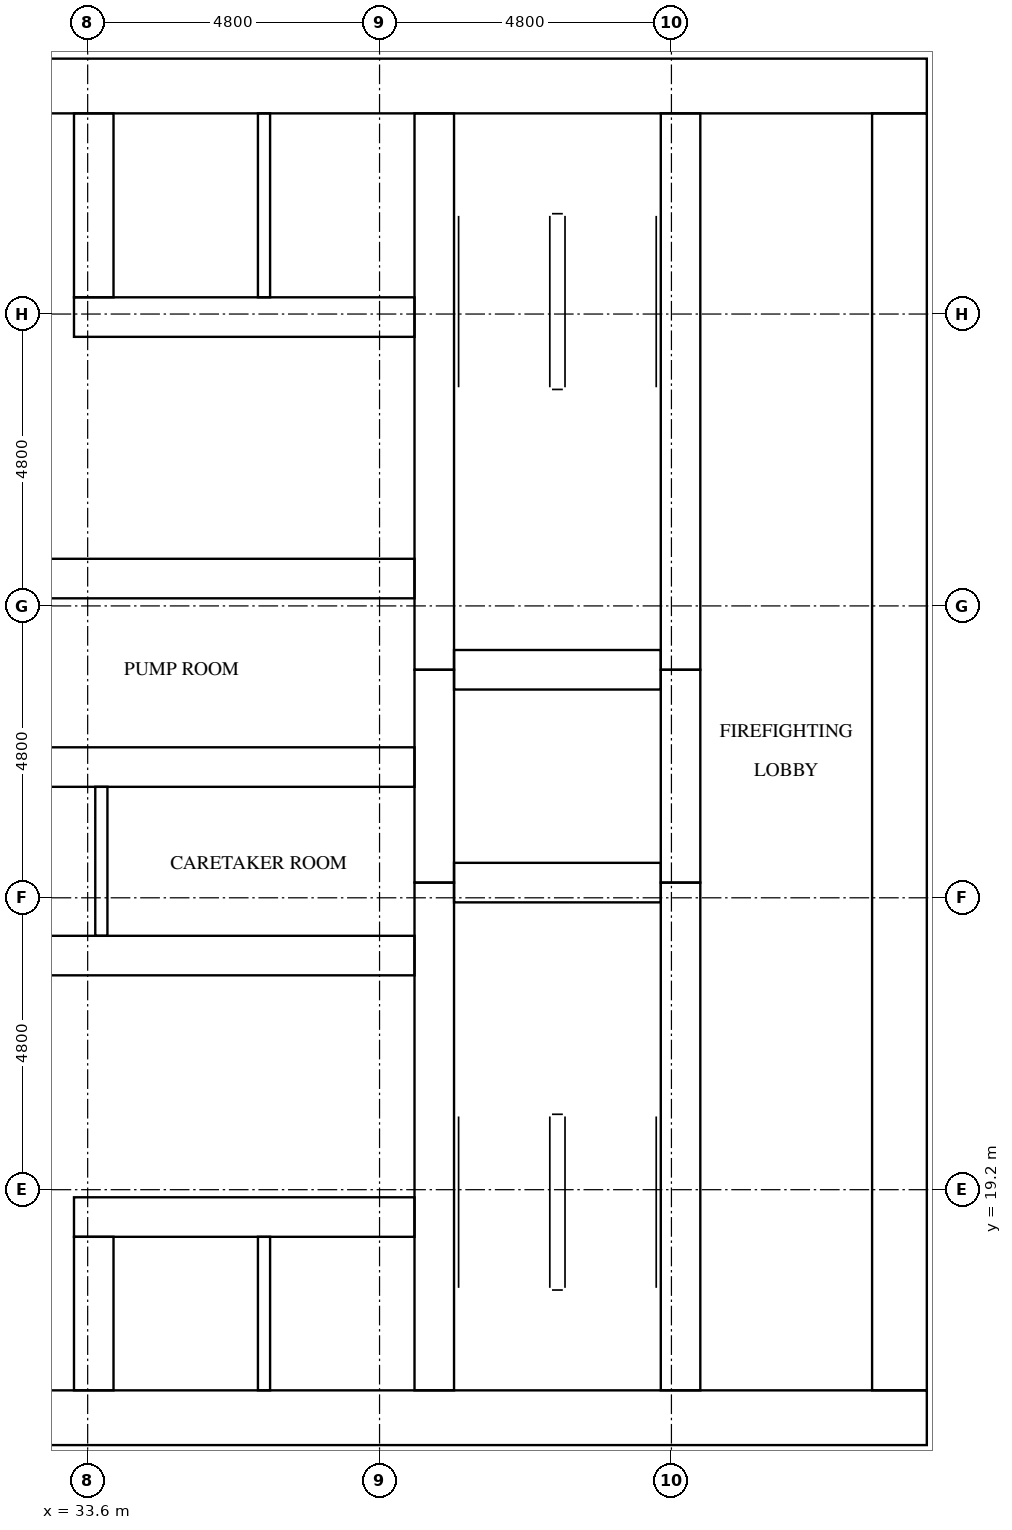
"""IFC4 building model, lengths in metres.
Left out: names, types, materials, properties, quantities, classifications, styles, units other than length and angle.
Written with IfcOpenShell. Run it as: python <this file> out.ifc"""

import sys

from ifc_helpers import new_model, si_unit, direction, frame, frame_2d, origin, place, context, subcontext, project, spatial, rectangle, extrude, element, fill, save


model = new_model("IFC4")
c1 = context("Model", 3, precision=1e-05, world=origin(), true_north=direction((0.0, 1.0)))
c2 = subcontext(c1, "Body", "Model", "MODEL_VIEW")
j1 = project(units=[si_unit("LENGTHUNIT", "METRE"), si_unit("PLANEANGLEUNIT", "RADIAN")], contexts=[c1])
p1 = place(None, origin())
s1 = spatial("IfcSite", under=j1, at=p1, CompositionType="ELEMENT")
p2 = place(p1, origin())
s2 = spatial("IfcBuilding", under=s1, at=p2, CompositionType="ELEMENT")
p3 = place(p2, frame((0.0, 0.0, 106.7)))
s3 = spatial("IfcBuildingStorey", under=s2, at=p3, CompositionType="ELEMENT", Elevation=106.7)
p4 = place(p3, frame((15.0, 15.45, 0.0), z_axis=(0.0, 0.0, 1.0), x_axis=(1.0, 0.0, 0.0)))
e1 = element("IfcWall", 1, at=p4, inside=s3, PredefinedType="SHEAR", context=c2, shape_type="SweptSolid", body=[
    extrude(rectangle(XDim=32.4, YDim=0.9, at=frame_2d((16.2, 0.0))), origin(), (0.0, 0.0, 1.0), 3.2),
])
p5 = place(p4, frame((15.3, 0.0, 0.0)))
e2 = element("IfcOpeningElement", 2, at=p5, cuts=e1, PredefinedType="OPENING", context=c2, shape_type="SweptSolid", body=[
    extrude(rectangle(XDim=1.8, YDim=2.1, at=frame_2d((0.9, 1.05))), frame((0.0, 0.46, 0.0), z_axis=(0.0, -1.0, 0.0), x_axis=(1.0, 0.0, 0.0)), (0.0, 0.0, 1.0), 0.92),
])
p6 = place(p3, frame((15.0, 37.35, 0.0), z_axis=(0.0, 0.0, 1.0), x_axis=(1.0, 0.0, 0.0)))
e3 = element("IfcWall", 3, at=p6, inside=s3, PredefinedType="SHEAR", context=c2, shape_type="SweptSolid", body=[
    extrude(rectangle(XDim=32.4, YDim=0.9, at=frame_2d((16.2, 0.0))), origin(), (0.0, 0.0, 1.0), 3.2),
])
p7 = place(p6, frame((15.3, 0.0, 0.0)))
e4 = element("IfcOpeningElement", 4, at=p7, cuts=e3, PredefinedType="OPENING", context=c2, shape_type="SweptSolid", body=[
    extrude(rectangle(XDim=1.8, YDim=2.1, at=frame_2d((0.9, 1.05))), frame((0.0, 0.46, 0.0), z_axis=(0.0, -1.0, 0.0), x_axis=(1.0, 0.0, 0.0)), (0.0, 0.0, 1.0), 0.92),
])
p8 = place(p6, frame((1.794, 0.0, 0.0)))
e5 = element("IfcOpeningElement", 5, at=p8, cuts=e3, PredefinedType="OPENING", context=c2, shape_type="SweptSolid", body=[
    extrude(rectangle(XDim=1.0, YDim=2.1, at=frame_2d((0.5, 1.05))), frame((0.0, 0.46, 0.0), z_axis=(0.0, -1.0, 0.0), x_axis=(1.0, 0.0, 0.0)), (0.0, 0.0, 1.0), 0.92),
])
p9 = place(p6, frame((5.331, 0.0, 0.0)))
e6 = element("IfcOpeningElement", 6, at=p9, cuts=e3, PredefinedType="OPENING", context=c2, shape_type="SweptSolid", body=[
    extrude(rectangle(XDim=1.0, YDim=2.1, at=frame_2d((0.5, 1.05))), frame((0.0, 0.46, 0.0), z_axis=(0.0, -1.0, 0.0), x_axis=(1.0, 0.0, 0.0)), (0.0, 0.0, 1.0), 0.92),
])
p10 = place(p3, frame((46.95, 15.9, 0.0), z_axis=(0.0, 0.0, 1.0), x_axis=(0.0, 1.0, 0.0)))
e7 = element("IfcWall", 7, at=p10, inside=s3, PredefinedType="SHEAR", context=c2, shape_type="SweptSolid", body=[
    extrude(rectangle(XDim=21.0, YDim=0.9, at=frame_2d((10.5, 0.0))), origin(), (0.0, 0.0, 1.0), 3.2),
])
p11 = place(p10, frame((10.2, 0.0, 0.0)))
e8 = element("IfcOpeningElement", 8, at=p11, cuts=e7, PredefinedType="OPENING", context=c2, shape_type="SweptSolid", body=[
    extrude(rectangle(XDim=1.2, YDim=2.1, at=frame_2d((0.6, 1.05))), frame((0.0, 0.46, 0.0), z_axis=(0.0, -1.0, 0.0), x_axis=(1.0, 0.0, 0.0)), (0.0, 0.0, 1.0), 0.92),
])
p12 = place(p3, frame((39.3, 15.9, 0.0), z_axis=(0.0, 0.0, 1.0), x_axis=(0.0, 1.0, 0.0)))
e9 = element("IfcWall", 9, at=p12, inside=s3, PredefinedType="SHEAR", context=c2, shape_type="SweptSolid", body=[
    extrude(rectangle(XDim=8.35, YDim=0.65, at=frame_2d((4.175, 0.0))), origin(), (0.0, 0.0, 1.0), 3.2),
])
p13 = place(p3, frame((39.3, 24.25, 0.0), z_axis=(0.0, 0.0, 1.0), x_axis=(0.0, 1.0, 0.0)))
e10 = element("IfcWall", 10, at=p13, inside=s3, PredefinedType="SHEAR", context=c2, shape_type="SweptSolid", body=[
    extrude(rectangle(XDim=3.5, YDim=0.65, at=frame_2d((1.75, 0.0))), origin(), (0.0, 0.0, 1.0), 3.2),
])
p14 = place(p3, frame((39.3, 27.75, 0.0), z_axis=(0.0, 0.0, 1.0), x_axis=(0.0, 1.0, 0.0)))
e11 = element("IfcWall", 11, at=p14, inside=s3, PredefinedType="SHEAR", context=c2, shape_type="SweptSolid", body=[
    extrude(rectangle(XDim=9.15, YDim=0.65, at=frame_2d((4.575, 0.0))), origin(), (0.0, 0.0, 1.0), 3.2),
])
p15 = place(p3, frame((43.35, 15.9, 0.0), z_axis=(0.0, 0.0, 1.0), x_axis=(0.0, 1.0, 0.0)))
e12 = element("IfcWall", 12, at=p15, inside=s3, PredefinedType="SHEAR", context=c2, shape_type="SweptSolid", body=[
    extrude(rectangle(XDim=8.35, YDim=0.65, at=frame_2d((4.175, 0.0))), origin(), (0.0, 0.0, 1.0), 3.2),
])
p16 = place(p15, frame((0.3, 0.0, 0.0)))
e13 = element("IfcOpeningElement", 13, at=p16, cuts=e12, PredefinedType="OPENING", context=c2, shape_type="SweptSolid", body=[
    extrude(rectangle(XDim=1.2, YDim=2.1, at=frame_2d((0.6, 1.05))), frame((0.0, 0.335, 0.0), z_axis=(0.0, -1.0, 0.0), x_axis=(1.0, 0.0, 0.0)), (0.0, 0.0, 1.0), 0.67),
])
p17 = place(p3, frame((43.35, 24.25, 0.0), z_axis=(0.0, 0.0, 1.0), x_axis=(0.0, 1.0, 0.0)))
e14 = element("IfcWall", 14, at=p17, inside=s3, PredefinedType="SHEAR", context=c2, shape_type="SweptSolid", body=[
    extrude(rectangle(XDim=3.5, YDim=0.65, at=frame_2d((1.75, 0.0))), origin(), (0.0, 0.0, 1.0), 3.2),
])
p18 = place(p17, frame((1.2, 0.0, 0.0)))
e15 = element("IfcOpeningElement", 15, at=p18, cuts=e14, PredefinedType="OPENING", context=c2, shape_type="SweptSolid", body=[
    extrude(rectangle(XDim=1.1, YDim=2.1, at=frame_2d((0.55, 1.05))), frame((0.0, 0.335, 0.0), z_axis=(0.0, -1.0, 0.0), x_axis=(1.0, 0.0, 0.0)), (0.0, 0.0, 1.0), 0.67),
])
p19 = place(p3, frame((43.35, 27.75, 0.0), z_axis=(0.0, 0.0, 1.0), x_axis=(0.0, 1.0, 0.0)))
e16 = element("IfcWall", 16, at=p19, inside=s3, PredefinedType="SHEAR", context=c2, shape_type="SweptSolid", body=[
    extrude(rectangle(XDim=9.15, YDim=0.65, at=frame_2d((4.575, 0.0))), origin(), (0.0, 0.0, 1.0), 3.2),
])
p20 = place(p19, frame((7.65, 0.0, 0.0)))
e17 = element("IfcOpeningElement", 17, at=p20, cuts=e16, PredefinedType="OPENING", context=c2, shape_type="SweptSolid", body=[
    extrude(rectangle(XDim=1.2, YDim=2.1, at=frame_2d((0.6, 1.05))), frame((0.0, 0.335, 0.0), z_axis=(0.0, -1.0, 0.0), x_axis=(1.0, 0.0, 0.0)), (0.0, 0.0, 1.0), 0.67),
])
for number, where, z_axis, x_axis in (
    (18, (39.625, 24.25, 0.0), (0.0, 0.0, 1.0), (1.0, 0.0, 0.0)),
    (19, (39.625, 27.75, 0.0), (0.0, 0.0, 1.0), (1.0, 0.0, 0.0)),
):
    element("IfcWall", number, at=place(p3, frame(where, z_axis=z_axis, x_axis=x_axis)), inside=s3, PredefinedType="SHEAR", context=c2, shape_type="SweptSolid", body=[
        extrude(rectangle(XDim=3.4, YDim=0.65, at=frame_2d((1.7, 0.0))), origin(), (0.0, 0.0, 1.0), 3.2),
    ])
p21 = place(p3, frame((33.375, 18.75, 0.0), z_axis=(0.0, 0.0, 1.0), x_axis=(1.0, 0.0, 0.0)))
e20 = element("IfcWall", 20, at=p21, inside=s3, PredefinedType="SHEAR", context=c2, shape_type="SweptSolid", body=[
    extrude(rectangle(XDim=5.6, YDim=0.65, at=frame_2d((2.8, 0.0))), origin(), (0.0, 0.0, 1.0), 3.2),
])
p22 = place(p21, frame((1.288, 0.0, 0.0)))
e21 = element("IfcOpeningElement", 21, at=p22, cuts=e20, PredefinedType="OPENING", context=c2, shape_type="SweptSolid", body=[
    extrude(rectangle(XDim=1.1, YDim=2.1, at=frame_2d((0.55, 1.05))), frame((0.0, 0.335, 0.0), z_axis=(0.0, -1.0, 0.0), x_axis=(1.0, 0.0, 0.0)), (0.0, 0.0, 1.0), 0.67),
])
p23 = place(p21, frame((3.863, 0.0, 0.0)))
e22 = element("IfcOpeningElement", 22, at=p23, cuts=e20, PredefinedType="OPENING", context=c2, shape_type="SweptSolid", body=[
    extrude(rectangle(XDim=1.1, YDim=2.1, at=frame_2d((0.55, 1.05))), frame((0.0, 0.335, 0.0), z_axis=(0.0, -1.0, 0.0), x_axis=(1.0, 0.0, 0.0)), (0.0, 0.0, 1.0), 0.67),
])
p24 = place(p3, frame((23.425, 23.05, 0.0), z_axis=(0.0, 0.0, 1.0), x_axis=(1.0, 0.0, 0.0)))
e23 = element("IfcWall", 23, at=p24, inside=s3, PredefinedType="SHEAR", context=c2, shape_type="SweptSolid", body=[
    extrude(rectangle(XDim=15.55, YDim=0.65, at=frame_2d((7.775, 0.0))), origin(), (0.0, 0.0, 1.0), 3.2),
])
p25 = place(p24, frame((2.025, 0.0, 0.0)))
e24 = element("IfcOpeningElement", 24, at=p25, cuts=e23, PredefinedType="OPENING", context=c2, shape_type="SweptSolid", body=[
    extrude(rectangle(XDim=1.0, YDim=2.1, at=frame_2d((0.5, 1.05))), frame((0.0, 0.335, 0.0), z_axis=(0.0, -1.0, 0.0), x_axis=(1.0, 0.0, 0.0)), (0.0, 0.0, 1.0), 0.67),
])
p26 = place(p24, frame((12.525, 0.0, 0.0)))
e25 = element("IfcOpeningElement", 25, at=p26, cuts=e23, PredefinedType="OPENING", context=c2, shape_type="SweptSolid", body=[
    extrude(rectangle(XDim=1.0, YDim=2.1, at=frame_2d((0.5, 1.05))), frame((0.0, 0.335, 0.0), z_axis=(0.0, -1.0, 0.0), x_axis=(1.0, 0.0, 0.0)), (0.0, 0.0, 1.0), 0.67),
])
p27 = place(p3, frame((23.425, 26.15, 0.0), z_axis=(0.0, 0.0, 1.0), x_axis=(1.0, 0.0, 0.0)))
e26 = element("IfcWall", 26, at=p27, inside=s3, PredefinedType="SHEAR", context=c2, shape_type="SweptSolid", body=[
    extrude(rectangle(XDim=15.55, YDim=0.65, at=frame_2d((7.775, 0.0))), origin(), (0.0, 0.0, 1.0), 3.2),
])
p28 = place(p3, frame((23.425, 29.25, 0.0), z_axis=(0.0, 0.0, 1.0), x_axis=(1.0, 0.0, 0.0)))
e27 = element("IfcWall", 27, at=p28, inside=s3, PredefinedType="SHEAR", context=c2, shape_type="SweptSolid", body=[
    extrude(rectangle(XDim=15.55, YDim=0.65, at=frame_2d((7.775, 0.0))), origin(), (0.0, 0.0, 1.0), 3.2),
])
p29 = place(p28, frame((3.337, 0.0, 0.0)))
e28 = element("IfcOpeningElement", 28, at=p29, cuts=e27, PredefinedType="OPENING", context=c2, shape_type="SweptSolid", body=[
    extrude(rectangle(XDim=1.0, YDim=2.1, at=frame_2d((0.5, 1.05))), frame((0.0, 0.335, 0.0), z_axis=(0.0, -1.0, 0.0), x_axis=(1.0, 0.0, 0.0)), (0.0, 0.0, 1.0), 0.67),
])
p30 = place(p28, frame((11.212, 0.0, 0.0)))
e29 = element("IfcOpeningElement", 29, at=p30, cuts=e27, PredefinedType="OPENING", context=c2, shape_type="SweptSolid", body=[
    extrude(rectangle(XDim=1.0, YDim=2.1, at=frame_2d((0.5, 1.05))), frame((0.0, 0.335, 0.0), z_axis=(0.0, -1.0, 0.0), x_axis=(1.0, 0.0, 0.0)), (0.0, 0.0, 1.0), 0.67),
])
p31 = place(p3, frame((33.375, 33.55, 0.0), z_axis=(0.0, 0.0, 1.0), x_axis=(1.0, 0.0, 0.0)))
e30 = element("IfcWall", 30, at=p31, inside=s3, PredefinedType="SHEAR", context=c2, shape_type="SweptSolid", body=[
    extrude(rectangle(XDim=5.6, YDim=0.65, at=frame_2d((2.8, 0.0))), origin(), (0.0, 0.0, 1.0), 3.2),
])
p32 = place(p3, frame((33.7, 15.9, 0.0), z_axis=(0.0, 0.0, 1.0), x_axis=(0.0, 1.0, 0.0)))
e31 = element("IfcWall", 31, at=p32, inside=s3, PredefinedType="SHEAR", context=c2, shape_type="SweptSolid", body=[
    extrude(rectangle(XDim=2.525, YDim=0.65, at=frame_2d((1.263, 0.0))), origin(), (0.0, 0.0, 1.0), 3.2),
])
p33 = place(p3, frame((33.7, 33.875, 0.0), z_axis=(0.0, 0.0, 1.0), x_axis=(0.0, 1.0, 0.0)))
e32 = element("IfcWall", 32, at=p33, inside=s3, PredefinedType="SHEAR", context=c2, shape_type="SweptSolid", body=[
    extrude(rectangle(XDim=3.025, YDim=0.65, at=frame_2d((1.512, 0.0))), origin(), (0.0, 0.0, 1.0), 3.2),
])
p34 = place(p3, frame((33.825, 23.375, 0.0), z_axis=(0.0, 0.0, 1.0), x_axis=(0.0, 1.0, 0.0)))
e33 = element("IfcWall", 33, at=p34, inside=s3, PredefinedType="SOLIDWALL", context=c2, shape_type="SweptSolid", body=[
    extrude(rectangle(XDim=2.45, YDim=0.2, at=frame_2d((1.225, 0.0))), origin(), (0.0, 0.0, 1.0), 3.2),
])
p35 = place(p3, frame((36.5, 15.9, 0.0), z_axis=(0.0, 0.0, 1.0), x_axis=(0.0, 1.0, 0.0)))
e34 = element("IfcWall", 34, at=p35, inside=s3, PredefinedType="SOLIDWALL", context=c2, shape_type="SweptSolid", body=[
    extrude(rectangle(XDim=2.525, YDim=0.2, at=frame_2d((1.263, 0.0))), origin(), (0.0, 0.0, 1.0), 3.2),
])
p36 = place(p3, frame((36.5, 33.875, 0.0), z_axis=(0.0, 0.0, 1.0), x_axis=(0.0, 1.0, 0.0)))
e35 = element("IfcWall", 35, at=p36, inside=s3, PredefinedType="SOLIDWALL", context=c2, shape_type="SweptSolid", body=[
    extrude(rectangle(XDim=3.025, YDim=0.2, at=frame_2d((1.512, 0.0))), origin(), (0.0, 0.0, 1.0), 3.2),
])
p37 = place(p22, origin())
e36 = element("IfcDoor", 36, at=p37, inside=s3, OperationType="DOUBLE_DOOR_SLIDING", PredefinedType="DOOR", context=c2, shape_type="SweptSolid", body=[
    extrude(rectangle(XDim=1.1, YDim=2.1, at=frame_2d((0.55, 1.05))), frame((0.0, 0.025, 0.0), z_axis=(0.0, -1.0, 0.0), x_axis=(1.0, 0.0, 0.0)), (0.0, 0.0, 1.0), 0.05),
])
fill(e21, e36)
p38 = place(p23, origin())
e37 = element("IfcDoor", 37, at=p38, inside=s3, OperationType="DOUBLE_DOOR_SLIDING", PredefinedType="DOOR", context=c2, shape_type="SweptSolid", body=[
    extrude(rectangle(XDim=1.1, YDim=2.1, at=frame_2d((0.55, 1.05))), frame((0.0, 0.025, 0.0), z_axis=(0.0, -1.0, 0.0), x_axis=(1.0, 0.0, 0.0)), (0.0, 0.0, 1.0), 0.05),
])
fill(e22, e37)
p39 = place(p18, origin())
e38 = element("IfcDoor", 38, at=p39, inside=s3, OperationType="DOUBLE_DOOR_SLIDING", PredefinedType="DOOR", context=c2, shape_type="SweptSolid", body=[
    extrude(rectangle(XDim=1.1, YDim=2.1, at=frame_2d((0.55, 1.05))), frame((0.0, 0.025, 0.0), z_axis=(0.0, -1.0, 0.0), x_axis=(1.0, 0.0, 0.0)), (0.0, 0.0, 1.0), 0.05),
])
fill(e15, e38)
p40 = place(p16, origin())
e39 = element("IfcDoor", 39, at=p40, inside=s3, OperationType="SINGLE_SWING_RIGHT", PredefinedType="DOOR", context=c2, shape_type="SweptSolid", body=[
    extrude(rectangle(XDim=1.2, YDim=2.1, at=frame_2d((0.6, 1.05))), frame((0.0, 0.025, 0.0), z_axis=(0.0, -1.0, 0.0), x_axis=(1.0, 0.0, 0.0)), (0.0, 0.0, 1.0), 0.05),
])
fill(e13, e39)
p41 = place(p20, origin())
e40 = element("IfcDoor", 40, at=p41, inside=s3, OperationType="SINGLE_SWING_LEFT", PredefinedType="DOOR", context=c2, shape_type="SweptSolid", body=[
    extrude(rectangle(XDim=1.2, YDim=2.1, at=frame_2d((0.6, 1.05))), frame((0.0, 0.025, 0.0), z_axis=(0.0, -1.0, 0.0), x_axis=(1.0, 0.0, 0.0)), (0.0, 0.0, 1.0), 0.05),
])
fill(e17, e40)
p42 = place(p11, origin())
e41 = element("IfcDoor", 41, at=p42, inside=s3, OperationType="SINGLE_SWING_LEFT", PredefinedType="DOOR", context=c2, shape_type="SweptSolid", body=[
    extrude(rectangle(XDim=1.2, YDim=2.1, at=frame_2d((0.6, 1.05))), frame((0.0, 0.025, 0.0), z_axis=(0.0, -1.0, 0.0), x_axis=(1.0, 0.0, 0.0)), (0.0, 0.0, 1.0), 0.05),
])
fill(e8, e41)
p43 = place(p26, frame((1.0, 0.0, 0.0), z_axis=(0.0, 0.0, 1.0), x_axis=(-1.0, 0.0, 0.0)))
e42 = element("IfcDoor", 42, at=p43, inside=s3, OperationType="SINGLE_SWING_LEFT", PredefinedType="DOOR", context=c2, shape_type="SweptSolid", body=[
    extrude(rectangle(XDim=1.0, YDim=2.1, at=frame_2d((0.5, 1.05))), frame((0.0, 0.025, 0.0), z_axis=(0.0, -1.0, 0.0), x_axis=(1.0, 0.0, 0.0)), (0.0, 0.0, 1.0), 0.05),
])
fill(e25, e42)
p44 = place(p30, origin())
e43 = element("IfcDoor", 43, at=p44, inside=s3, OperationType="SINGLE_SWING_LEFT", PredefinedType="DOOR", context=c2, shape_type="SweptSolid", body=[
    extrude(rectangle(XDim=1.0, YDim=2.1, at=frame_2d((0.5, 1.05))), frame((0.0, 0.025, 0.0), z_axis=(0.0, -1.0, 0.0), x_axis=(1.0, 0.0, 0.0)), (0.0, 0.0, 1.0), 0.05),
])
fill(e29, e43)
save(model, sys.argv[1])
